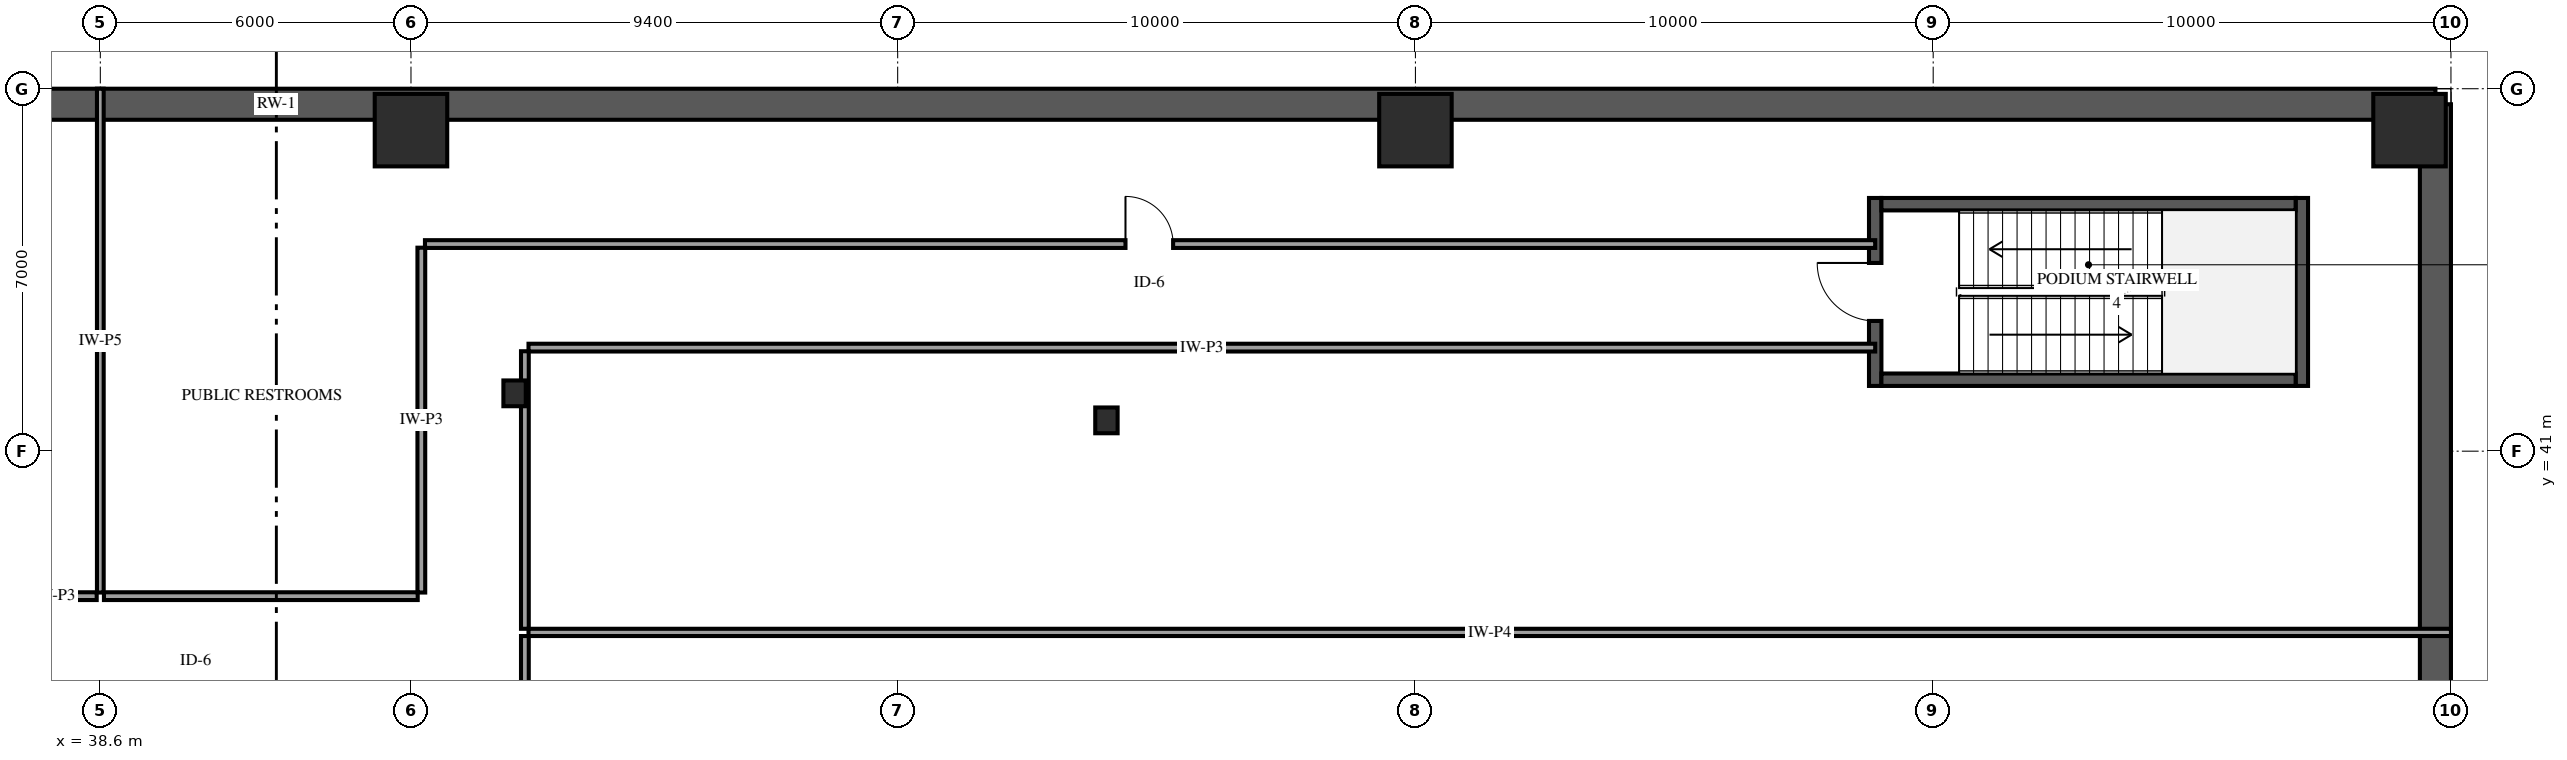
"""IFC4 building model, lengths in metres.
Left out: names, types, materials, properties, quantities, classifications, styles, units other than length and angle.
Written with IfcOpenShell. Run it as: python <this file> out.ifc"""

import sys

from ifc_helpers import new_model, si_unit, direction, frame, frame_2d, origin, origin_2d, place, context, subcontext, project, spatial, rectangle, i_section, extrude, element, fill, save


model = new_model("IFC4")
c1 = context("Model", 3, precision=1e-05, world=origin(), true_north=direction((0.0, 1.0)))
c2 = subcontext(c1, "Body", "Model", "MODEL_VIEW")
j1 = project(units=[si_unit("LENGTHUNIT", "METRE"), si_unit("PLANEANGLEUNIT", "RADIAN")], contexts=[c1])
p1 = place(None, origin())
s1 = spatial("IfcSite", under=j1, at=p1, CompositionType="ELEMENT")
p2 = place(p1, origin())
s2 = spatial("IfcBuilding", under=s1, at=p2, CompositionType="ELEMENT")
p3 = place(p2, frame((0.0, 0.0, -5.4)))
s3 = spatial("IfcBuildingStorey", under=s2, at=p3, CompositionType="ELEMENT", Elevation=-5.4)
p4 = place(p3, frame((83.7, 2.3, 0.0), z_axis=(0.0, 0.0, 1.0), x_axis=(0.0, 1.0, 0.0)))
e1 = element("IfcWall", 1, at=p4, inside=s3, PredefinedType="USERDEFINED", context=c2, shape_type="SweptSolid", body=[
    extrude(rectangle(XDim=45.4, YDim=0.6, at=frame_2d((22.7, 0.0))), origin(), (0.0, 0.0, 1.0), 5.4),
])
p5 = place(p3, frame((83.7, 47.7, 0.0), z_axis=(0.0, 0.0, 1.0), x_axis=(-1.0, 0.0, 0.0)))
e2 = element("IfcWall", 2, at=p5, inside=s3, PredefinedType="USERDEFINED", context=c2, shape_type="SweptSolid", body=[
    extrude(rectangle(XDim=83.4, YDim=0.6, at=frame_2d((41.7, 0.0))), origin(), (0.0, 0.0, 1.0), 5.4),
])
p6 = place(p3, frame((72.88, 42.26, 0.0), z_axis=(0.0, 0.0, 1.0), x_axis=(0.0, 1.0, 0.0)))
e3 = element("IfcWall", 3, at=p6, inside=s3, PredefinedType="SHEAR", context=c2, shape_type="SweptSolid", body=[
    extrude(rectangle(XDim=3.63, YDim=0.24, at=frame_2d((1.815, 0.0))), origin(), (0.0, 0.0, 1.0), 5.4),
])
p7 = place(p6, frame((1.255, 0.0, 0.0)))
e4 = element("IfcOpeningElement", 4, at=p7, cuts=e3, PredefinedType="OPENING", context=c2, shape_type="SweptSolid", body=[
    extrude(rectangle(XDim=1.12, YDim=2.15, at=frame_2d((0.56, 1.075))), frame((0.0, 0.13, 0.0), z_axis=(0.0, -1.0, 0.0), x_axis=(1.0, 0.0, 0.0)), (0.0, 0.0, 1.0), 0.26),
])
p8 = place(p3, frame((81.12, 42.26, 0.0), z_axis=(0.0, 0.0, 1.0), x_axis=(0.0, 1.0, 0.0)))
e5 = element("IfcWall", 5, at=p8, inside=s3, PredefinedType="SHEAR", context=c2, shape_type="SweptSolid", body=[
    extrude(rectangle(XDim=3.63, YDim=0.24, at=frame_2d((1.815, 0.0))), origin(), (0.0, 0.0, 1.0), 5.4),
])
for number, where, z_axis, x_axis in (
    (6, (73.0, 42.38, 0.0), (0.0, 0.0, 1.0), (1.0, 0.0, 0.0)),
    (7, (73.0, 45.77, 0.0), (0.0, 0.0, 1.0), (1.0, 0.0, 0.0)),
):
    element("IfcWall", number, at=place(p3, frame(where, z_axis=z_axis, x_axis=x_axis)), inside=s3, PredefinedType="SHEAR", context=c2, shape_type="SweptSolid", body=[
        extrude(rectangle(XDim=8.0, YDim=0.24, at=frame_2d((4.0, 0.0))), origin(), (0.0, 0.0, 1.0), 5.4),
    ])
for number, where, z_axis, x_axis in (
    (8, (64.0, 47.2, 0.0), (0.0, 0.0, 1.0), (1.0, 0.0, 0.0)),
    (9, (83.2, 47.2, 0.0), (0.0, 0.0, 1.0), (1.0, 0.0, 0.0)),
    (10, (44.6, 47.2, 0.0), (0.0, 0.0, 1.0), (1.0, 0.0, 0.0)),
):
    element("IfcColumn", number, at=place(p3, frame(where, z_axis=z_axis, x_axis=x_axis)), inside=s3, PredefinedType="COLUMN", context=c2, shape_type="SweptSolid", body=[
        extrude(rectangle(XDim=1.4, YDim=1.4, at=origin_2d()), origin(), (0.0, 0.0, 1.0), 5.4),
    ])
for number, where, z_axis, x_axis in (
    (11, (58.032, 41.595, 0.0), (0.0, 0.0, 1.0), (1.0, 0.0, 0.0)),
    (12, (46.601, 42.117, 0.0), (0.0, 0.0, 1.0), (1.0, 0.0, 0.0)),
):
    element("IfcColumn", number, at=place(p3, frame(where, z_axis=z_axis, x_axis=x_axis)), inside=s3, PredefinedType="COLUMN", context=c2, shape_type="SweptSolid", body=[
        extrude(i_section(OverallWidth=0.432, OverallDepth=0.498, WebThickness=0.056, FlangeThickness=0.089, FilletRadius=0.038, at=origin_2d()), origin(), (0.0, 0.0, 1.0), 5.4),
    ])
p9 = place(p3, frame((46.87, 37.5, 0.0), z_axis=(0.0, 0.0, 1.0), x_axis=(1.0, 0.0, 0.0)))
e13 = element("IfcWall", 13, at=p9, inside=s3, PredefinedType="PARTITIONING", context=c2, shape_type="SweptSolid", body=[
    extrude(rectangle(XDim=37.13, YDim=0.14, at=frame_2d((18.565, 0.0))), origin(), (0.0, 0.0, 1.0), 5.08),
])
p10 = place(p3, frame((44.87, 45.0, 0.0), z_axis=(0.0, 0.0, 1.0), x_axis=(1.0, 0.0, 0.0)))
e14 = element("IfcWall", 14, at=p10, inside=s3, PredefinedType="PARTITIONING", context=c2, shape_type="SweptSolid", body=[
    extrude(rectangle(XDim=28.01, YDim=0.15, at=frame_2d((14.005, 0.0))), origin(), (0.0, 0.0, 1.0), 5.08),
])
p11 = place(p10, frame((13.53, 0.0, 0.0)))
e15 = element("IfcOpeningElement", 15, at=p11, cuts=e14, PredefinedType="OPENING", context=c2, shape_type="SweptSolid", body=[
    extrude(rectangle(XDim=0.92, YDim=2.12, at=frame_2d((0.46, 1.06))), frame((0.0, 0.085, 0.0), z_axis=(0.0, -1.0, 0.0), x_axis=(1.0, 0.0, 0.0)), (0.0, 0.0, 1.0), 0.17),
])
p12 = place(p3, frame((72.88, 43.0, 0.0), z_axis=(0.0, 0.0, 1.0), x_axis=(-1.0, 0.0, 0.0)))
e16 = element("IfcWall", 16, at=p12, inside=s3, PredefinedType="PARTITIONING", context=c2, shape_type="SweptSolid", body=[
    extrude(rectangle(XDim=26.01, YDim=0.15, at=frame_2d((13.005, 0.0))), origin(), (0.0, 0.0, 1.0), 5.08),
])
p13 = place(p3, frame((46.8, 37.43, 0.0), z_axis=(0.0, 0.0, 1.0), x_axis=(0.0, -1.0, 0.0)))
e17 = element("IfcWall", 17, at=p13, inside=s3, PredefinedType="PARTITIONING", context=c2, shape_type="SweptSolid", body=[
    extrude(rectangle(XDim=24.86, YDim=0.15, at=frame_2d((12.43, 0.0))), origin(), (0.0, 0.0, 1.0), 5.08),
])
p14 = place(p13, frame((11.955, 0.0, 0.0)))
e18 = element("IfcOpeningElement", 18, at=p14, cuts=e17, PredefinedType="OPENING", context=c2, shape_type="SweptSolid", body=[
    extrude(rectangle(XDim=0.92, YDim=2.12, at=frame_2d((0.46, 1.06))), frame((0.0, 0.085, 0.0), z_axis=(0.0, -1.0, 0.0), x_axis=(1.0, 0.0, 0.0)), (0.0, 0.0, 1.0), 0.17),
])
p15 = place(p3, frame((38.6, 48.0, 0.0), z_axis=(0.0, 0.0, 1.0), x_axis=(0.0, -1.0, 0.0)))
e19 = element("IfcWall", 19, at=p15, inside=s3, PredefinedType="PARTITIONING", context=c2, shape_type="SweptSolid", body=[
    extrude(rectangle(XDim=9.73, YDim=0.13, at=frame_2d((4.865, 0.0))), origin(), (0.0, 0.0, 1.0), 5.08),
])
p16 = place(p3, frame((30.67, 38.2, 0.0), z_axis=(0.0, 0.0, 1.0), x_axis=(1.0, 0.0, 0.0)))
e20 = element("IfcWall", 20, at=p16, inside=s3, PredefinedType="PARTITIONING", context=c2, shape_type="SweptSolid", body=[
    extrude(rectangle(XDim=7.86, YDim=0.15, at=frame_2d((3.93, 0.0))), origin(), (0.0, 0.0, 1.0), 5.08),
])
p17 = place(p3, frame((44.8, 38.27, 0.0), z_axis=(0.0, 0.0, 1.0), x_axis=(0.0, 1.0, 0.0)))
e21 = element("IfcWall", 21, at=p17, inside=s3, PredefinedType="PARTITIONING", context=c2, shape_type="SweptSolid", body=[
    extrude(rectangle(XDim=6.66, YDim=0.15, at=frame_2d((3.33, 0.0))), origin(), (0.0, 0.0, 1.0), 4.202),
])
p18 = place(p3, frame((38.67, 38.2, 0.0), z_axis=(0.0, 0.0, 1.0), x_axis=(1.0, 0.0, 0.0)))
e22 = element("IfcWall", 22, at=p18, inside=s3, PredefinedType="PARTITIONING", context=c2, shape_type="SweptSolid", body=[
    extrude(rectangle(XDim=6.06, YDim=0.15, at=frame_2d((3.03, 0.0))), origin(), (0.0, 0.0, 1.0), 5.08),
])
p19 = place(p3, frame((46.8, 42.93, 0.0), z_axis=(0.0, 0.0, 1.0), x_axis=(0.0, -1.0, 0.0)))
e23 = element("IfcWall", 23, at=p19, inside=s3, PredefinedType="PARTITIONING", context=c2, shape_type="SweptSolid", body=[
    extrude(rectangle(XDim=5.36, YDim=0.15, at=frame_2d((2.68, 0.0))), origin(), (0.0, 0.0, 1.0), 5.08),
])
p20 = place(p7, origin())
e24 = element("IfcDoor", 24, at=p20, inside=s3, OperationType="SINGLE_SWING_RIGHT", PredefinedType="DOOR", context=c2, shape_type="SweptSolid", body=[
    extrude(rectangle(XDim=1.12, YDim=2.15, at=frame_2d((0.56, 1.075))), frame((0.0, 0.025, 0.0), z_axis=(0.0, -1.0, 0.0), x_axis=(1.0, 0.0, 0.0)), (0.0, 0.0, 1.0), 0.05),
])
fill(e4, e24)
p21 = place(p11, origin())
e25 = element("IfcDoor", 25, at=p21, inside=s3, OperationType="SINGLE_SWING_LEFT", PredefinedType="DOOR", context=c2, shape_type="SweptSolid", body=[
    extrude(rectangle(XDim=0.92, YDim=2.12, at=frame_2d((0.46, 1.06))), frame((0.0, 0.025, 0.0), z_axis=(0.0, -1.0, 0.0), x_axis=(1.0, 0.0, 0.0)), (0.0, 0.0, 1.0), 0.05),
])
fill(e15, e25)
save(model, sys.argv[1])
